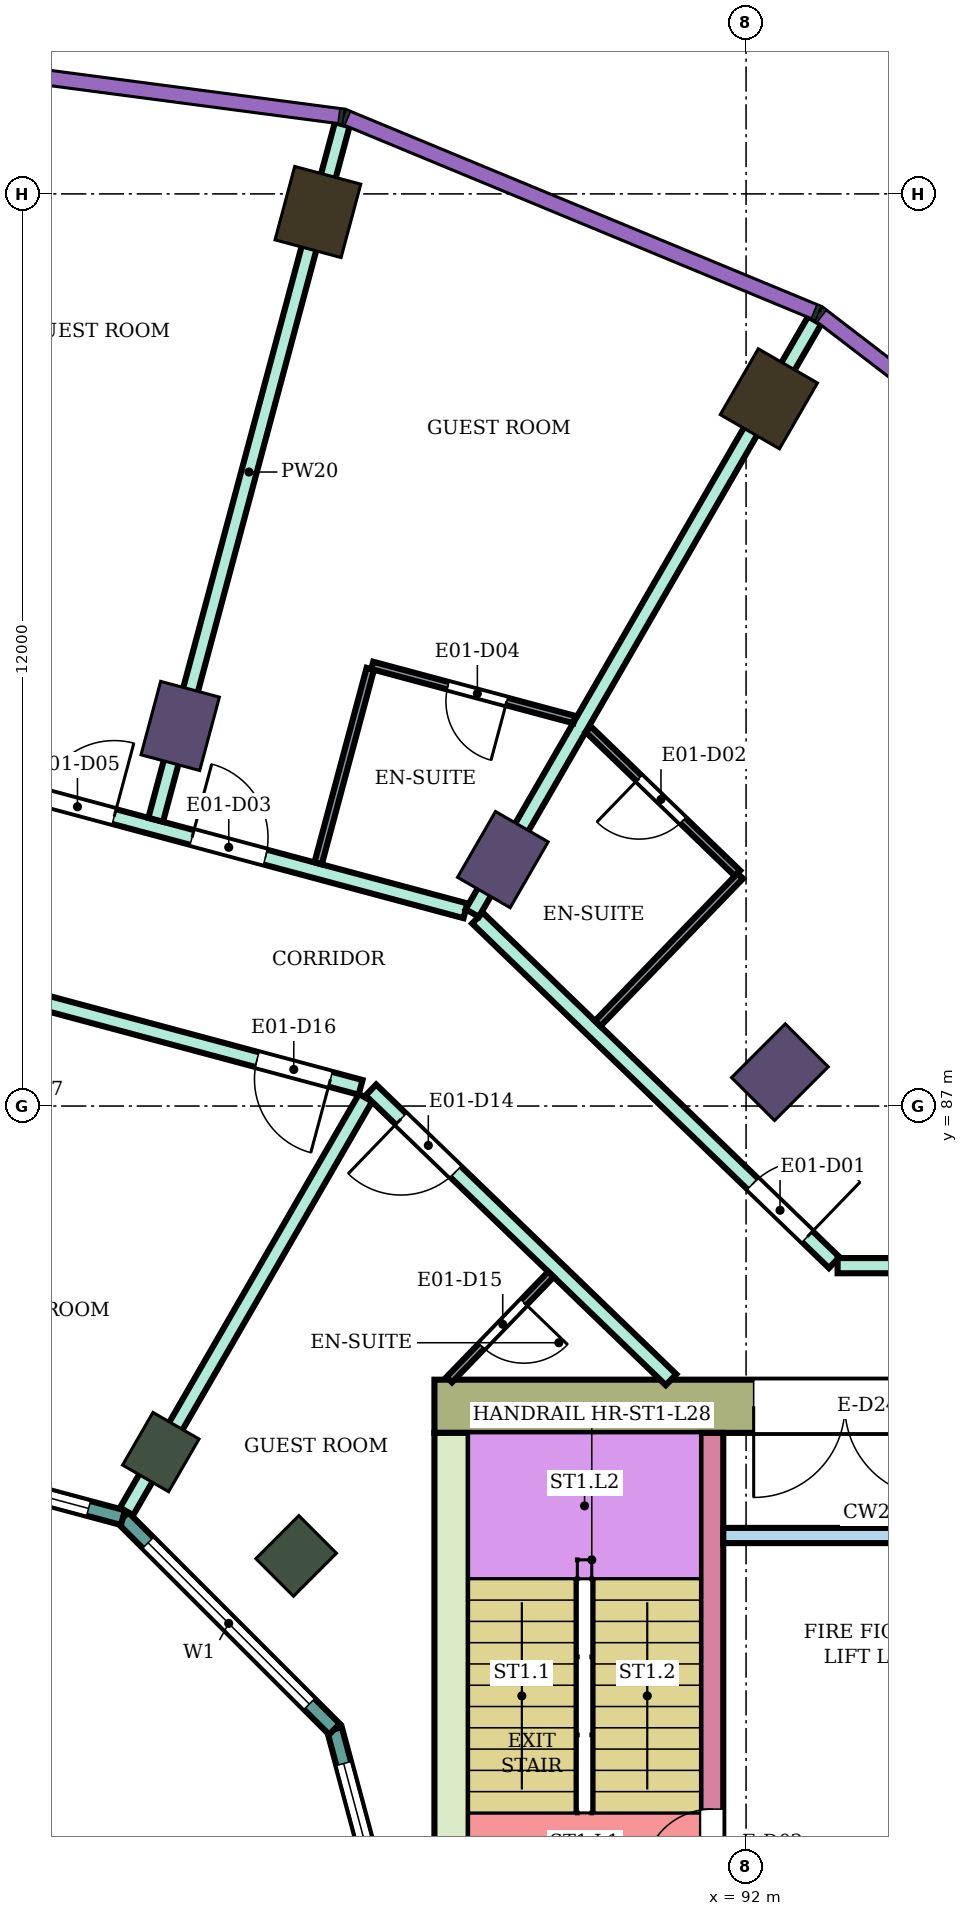
"""IFC4 building model, lengths in metres.
Left out: names, types, materials, properties, quantities, classifications, styles, units other than length and angle.
Written with IfcOpenShell. Run it as: python <this file> out.ifc"""

import sys

from ifc_helpers import new_model, si_unit, direction, frame, frame_2d, origin, origin_2d, place, context, subcontext, project, spatial, rectangle, extrude, element, fill, save


model = new_model("IFC4")
c1 = context("Model", 3, precision=1e-05, world=origin(), true_north=direction((0.0, 1.0)))
c2 = subcontext(c1, "Body", "Model", "MODEL_VIEW")
j1 = project(units=[si_unit("LENGTHUNIT", "METRE"), si_unit("PLANEANGLEUNIT", "RADIAN")], contexts=[c1])
p1 = place(None, origin())
s1 = spatial("IfcSite", under=j1, at=p1, CompositionType="ELEMENT")
p2 = place(p1, origin())
s2 = spatial("IfcBuilding", under=s1, at=p2, CompositionType="ELEMENT")
p3 = place(p2, frame((0.0, 0.0, 122.4)))
s3 = spatial("IfcBuildingStorey", under=s2, at=p3, CompositionType="ELEMENT", Elevation=122.4)
for number, where, z_axis, x_axis in (
    (1, (92.3, 96.304, 0.0), (0.0, 0.0, 1.0), (0.5, 0.866, 0.0)),
    (2, (86.367, 98.762, 0.0), (0.0, 0.0, 1.0), (0.259, 0.966, 0.0)),
):
    element("IfcColumn", number, at=place(p3, frame(where, z_axis=z_axis, x_axis=x_axis)), inside=s3, PredefinedType="COLUMN", context=c2, shape_type="SweptSolid", body=[
        extrude(rectangle(XDim=1.0, YDim=0.9, at=origin_2d()), origin(), (0.0, 0.0, 1.0), 3.9),
    ])
for number, where, z_axis, x_axis in (
    (3, (92.445, 87.445, 0.0), (0.0, 0.0, 1.0), (0.707, 0.707, 0.0)),
    (4, (88.8, 90.242, 0.0), (0.0, 0.0, 1.0), (0.5, 0.866, 0.0)),
    (5, (84.555, 92.0, 0.0), (0.0, 0.0, 1.0), (0.259, 0.966, 0.0)),
):
    element("IfcColumn", number, at=place(p3, frame(where, z_axis=z_axis, x_axis=x_axis)), inside=s3, PredefinedType="COLUMN", context=c2, shape_type="SweptSolid", body=[
        extrude(rectangle(XDim=1.0, YDim=0.8, at=origin_2d()), origin(), (0.0, 0.0, 1.0), 3.9),
    ])
for number, where, z_axis, x_axis in (
    (6, (86.081, 81.081, 0.0), (0.0, 0.0, 1.0), (0.707, 0.707, 0.0)),
    (7, (84.3, 82.448, 0.0), (0.0, 0.0, 1.0), (0.5, 0.866, 0.0)),
):
    element("IfcColumn", number, at=place(p3, frame(where, z_axis=z_axis, x_axis=x_axis)), inside=s3, PredefinedType="COLUMN", context=c2, shape_type="SweptSolid", body=[
        extrude(rectangle(XDim=0.8, YDim=0.7, at=origin_2d()), origin(), (0.0, 0.0, 1.0), 3.9),
    ])
p4 = place(p3, frame((87.9, 83.05, 0.0), z_axis=(0.0, 0.0, 1.0), x_axis=(1.0, 0.0, 0.0)))
e8 = element("IfcWall", 8, at=p4, inside=s3, PredefinedType="SHEAR", context=c2, shape_type="SweptSolid", body=[
    extrude(rectangle(XDim=14.8, YDim=0.7, at=frame_2d((7.4, 0.0))), origin(), (0.0, 0.0, 1.0), 3.58),
])
p5 = place(p4, frame((4.2, 0.0, 0.0)))
e9 = element("IfcOpeningElement", 9, at=p5, cuts=e8, PredefinedType="OPENING", context=c2, shape_type="SweptSolid", body=[
    extrude(rectangle(XDim=2.4, YDim=2.4, at=frame_2d((1.2, 1.2))), frame((0.0, 0.36, 0.0), z_axis=(0.0, -1.0, 0.0), x_axis=(1.0, 0.0, 0.0)), (0.0, 0.0, 1.0), 0.72),
])
p6 = place(p3, frame((88.125, 75.0, 0.0), z_axis=(0.0, 0.0, 1.0), x_axis=(0.0, 1.0, 0.0)))
e10 = element("IfcWall", 10, at=p6, inside=s3, PredefinedType="SHEAR", context=c2, shape_type="SweptSolid", body=[
    extrude(rectangle(XDim=7.7, YDim=0.45, at=frame_2d((3.85, 0.0))), origin(), (0.0, 0.0, 1.0), 3.58),
])
p7 = place(p3, frame((91.55, 75.0, 0.0), z_axis=(0.0, 0.0, 1.0), x_axis=(0.0, 1.0, 0.0)))
e11 = element("IfcWall", 11, at=p7, inside=s3, PredefinedType="SHEAR", context=c2, shape_type="SweptSolid", body=[
    extrude(rectangle(XDim=7.7, YDim=0.3, at=frame_2d((3.85, 0.0))), origin(), (0.0, 0.0, 1.0), 3.58),
])
p8 = place(p7, frame((1.85, 0.0, 0.0)))
e12 = element("IfcOpeningElement", 12, at=p8, cuts=e11, PredefinedType="OPENING", context=c2, shape_type="SweptSolid", body=[
    extrude(rectangle(XDim=0.9, YDim=2.1, at=frame_2d((0.45, 1.05))), frame((0.0, 0.16, 0.0), z_axis=(0.0, -1.0, 0.0), x_axis=(1.0, 0.0, 0.0)), (0.0, 0.0, 1.0), 0.32),
])
p9 = place(p3, frame((91.7, 81.35, 0.0), z_axis=(0.0, 0.0, 1.0), x_axis=(1.0, 0.0, 0.0)))
e13 = element("IfcWall", 13, at=p9, inside=s3, PredefinedType="SHEAR", context=c2, shape_type="SweptSolid", body=[
    extrude(rectangle(XDim=4.5, YDim=0.2, at=frame_2d((2.25, 0.0))), origin(), (0.0, 0.0, 1.0), 3.58),
])
p10 = place(p3, frame((87.604, 75.0, 0.0), z_axis=(0.0, 0.0, 1.0), x_axis=(-0.258789828301, 0.965933654434, 0.0)))
e14 = element("IfcWall", 14, at=p10, inside=s3, PredefinedType="NOTDEFINED", context=c2, shape_type="SweptSolid", body=[
    extrude(rectangle(XDim=3.936, YDim=0.2, at=frame_2d((1.968, 0.0))), origin(), (0.0, 0.0, 1.0), 3.9),
])
p11 = place(p10, frame((0.468, 0.0, 0.9)))
e15 = element("IfcOpeningElement", 15, at=p11, cuts=e14, PredefinedType="OPENING", context=c2, shape_type="SweptSolid", body=[
    extrude(rectangle(XDim=3.0, YDim=2.3, at=frame_2d((1.5, 1.15))), frame((0.0, 0.11, 0.0), z_axis=(0.0, -1.0, 0.0), x_axis=(1.0, 0.0, 0.0)), (0.0, 0.0, 1.0), 0.22),
])
p12 = place(p3, frame((86.585, 78.802, 0.0), z_axis=(0.0, 0.0, 1.0), x_axis=(-0.707106781187, 0.707106781187, 0.0)))
e16 = element("IfcWall", 16, at=p12, inside=s3, PredefinedType="NOTDEFINED", context=c2, shape_type="SweptSolid", body=[
    extrude(rectangle(XDim=3.936, YDim=0.2, at=frame_2d((1.968, 0.0))), origin(), (0.0, 0.0, 1.0), 3.9),
])
p13 = place(p12, frame((0.468, 0.0, 0.9)))
e17 = element("IfcOpeningElement", 17, at=p13, cuts=e16, PredefinedType="OPENING", context=c2, shape_type="SweptSolid", body=[
    extrude(rectangle(XDim=3.0, YDim=2.3, at=frame_2d((1.5, 1.15))), frame((0.0, 0.11, 0.0), z_axis=(0.0, -1.0, 0.0), x_axis=(1.0, 0.0, 0.0)), (0.0, 0.0, 1.0), 0.22),
])
p14 = place(p3, frame((83.802, 81.585, 0.0), z_axis=(0.0, 0.0, 1.0), x_axis=(-0.965933654434, 0.258789828301, 0.0)))
e18 = element("IfcWall", 18, at=p14, inside=s3, PredefinedType="NOTDEFINED", context=c2, shape_type="SweptSolid", body=[
    extrude(rectangle(XDim=3.936, YDim=0.2, at=frame_2d((1.968, 0.0))), origin(), (0.0, 0.0, 1.0), 3.9),
])
p15 = place(p14, frame((0.468, 0.0, 0.9)))
e19 = element("IfcOpeningElement", 19, at=p15, cuts=e18, PredefinedType="OPENING", context=c2, shape_type="SweptSolid", body=[
    extrude(rectangle(XDim=3.0, YDim=2.3, at=frame_2d((1.5, 1.15))), frame((0.0, 0.11, 0.0), z_axis=(0.0, -1.0, 0.0), x_axis=(1.0, 0.0, 0.0)), (0.0, 0.0, 1.0), 0.22),
])
p16 = place(p3, frame((80.0, 89.104, 0.0), z_axis=(0.0, 0.0, 1.0), x_axis=(0.965856548257, -0.259077455964, 0.0)))
e20 = element("IfcWall", 20, at=p16, inside=s3, PredefinedType="PARTITIONING", context=c2, shape_type="SweptSolid", body=[
    extrude(rectangle(XDim=7.173, YDim=0.2, at=frame_2d((3.586, 0.0))), origin(), (0.0, 0.0, 1.0), 3.45),
])
p17 = place(p16, frame((5.763, 0.0, 0.0)))
e21 = element("IfcOpeningElement", 21, at=p17, cuts=e20, PredefinedType="OPENING", context=c2, shape_type="SweptSolid", body=[
    extrude(rectangle(XDim=1.0, YDim=2.1, at=frame_2d((0.5, 1.05))), frame((0.0, 0.11, 0.0), z_axis=(0.0, -1.0, 0.0), x_axis=(1.0, 0.0, 0.0)), (0.0, 0.0, 1.0), 0.22),
])
p18 = place(p3, frame((80.0, 91.797, 0.0), z_axis=(0.0, 0.0, 1.0), x_axis=(0.965857042792, -0.259075612301, 0.0)))
e22 = element("IfcWall", 22, at=p18, inside=s3, PredefinedType="PARTITIONING", context=c2, shape_type="SweptSolid", body=[
    extrude(rectangle(XDim=8.602, YDim=0.2, at=frame_2d((4.301, 0.0))), origin(), (0.0, 0.0, 1.0), 3.45),
])
p19 = place(p18, frame((4.877, 0.0, 0.0)))
e23 = element("IfcOpeningElement", 23, at=p19, cuts=e22, PredefinedType="OPENING", context=c2, shape_type="SweptSolid", body=[
    extrude(rectangle(XDim=1.0, YDim=2.1, at=frame_2d((0.5, 1.05))), frame((0.0, 0.11, 0.0), z_axis=(0.0, -1.0, 0.0), x_axis=(1.0, 0.0, 0.0)), (0.0, 0.0, 1.0), 0.22),
])
p20 = place(p18, frame((2.817, 0.0, 0.0)))
e24 = element("IfcOpeningElement", 24, at=p20, cuts=e22, PredefinedType="OPENING", context=c2, shape_type="SweptSolid", body=[
    extrude(rectangle(XDim=1.0, YDim=2.1, at=frame_2d((0.5, 1.05))), frame((0.0, 0.11, 0.0), z_axis=(0.0, -1.0, 0.0), x_axis=(1.0, 0.0, 0.0)), (0.0, 0.0, 1.0), 0.22),
])
p21 = place(p3, frame((83.85, 81.667, 0.0), z_axis=(0.0, 0.0, 1.0), x_axis=(0.500224530691, 0.865895732115, 0.0)))
e25 = element("IfcWall", 25, at=p21, inside=s3, PredefinedType="PARTITIONING", context=c2, shape_type="SweptSolid", body=[
    extrude(rectangle(XDim=6.285, YDim=0.2, at=frame_2d((3.143, 0.0))), origin(), (0.0, 0.0, 1.0), 3.45),
])
p22 = place(p3, frame((84.233, 90.765, 0.0), z_axis=(0.0, 0.0, 1.0), x_axis=(0.259046484815, 0.965864855301, 0.0)))
e26 = element("IfcWall", 26, at=p22, inside=s3, PredefinedType="PARTITIONING", context=c2, shape_type="SweptSolid", body=[
    extrude(rectangle(XDim=9.475, YDim=0.2, at=frame_2d((4.737, 0.0))), origin(), (0.0, 0.0, 1.0), 3.45),
])
p23 = place(p3, frame((87.064, 87.211, 0.0), z_axis=(0.0, 0.0, 1.0), x_axis=(0.719540958932, -0.694450004262, 0.0)))
e27 = element("IfcWall", 27, at=p23, inside=s3, PredefinedType="PARTITIONING", context=c2, shape_type="SweptSolid", body=[
    extrude(rectangle(XDim=5.488, YDim=0.2, at=frame_2d((2.744, 0.0))), origin(), (0.0, 0.0, 1.0), 3.45),
])
p24 = place(p23, frame((0.55, 0.0, 0.0)))
e28 = element("IfcOpeningElement", 28, at=p24, cuts=e27, PredefinedType="OPENING", context=c2, shape_type="SweptSolid", body=[
    extrude(rectangle(XDim=1.0, YDim=2.1, at=frame_2d((0.5, 1.05))), frame((0.0, 0.11, 0.0), z_axis=(0.0, -1.0, 0.0), x_axis=(1.0, 0.0, 0.0)), (0.0, 0.0, 1.0), 0.22),
])
p25 = place(p3, frame((88.466, 89.473, 0.0), z_axis=(0.0, 0.0, 1.0), x_axis=(0.719346014649, -0.694651935295, 0.0)))
e29 = element("IfcWall", 29, at=p25, inside=s3, PredefinedType="PARTITIONING", context=c2, shape_type="SweptSolid", body=[
    extrude(rectangle(XDim=6.525, YDim=0.2, at=frame_2d((3.263, 0.0))), origin(), (0.0, 0.0, 1.0), 3.45),
])
p26 = place(p25, frame((5.034, 0.0, 0.0)))
e30 = element("IfcOpeningElement", 30, at=p26, cuts=e29, PredefinedType="OPENING", context=c2, shape_type="SweptSolid", body=[
    extrude(rectangle(XDim=1.0, YDim=2.1, at=frame_2d((0.5, 1.05))), frame((0.0, 0.11, 0.0), z_axis=(0.0, -1.0, 0.0), x_axis=(1.0, 0.0, 0.0)), (0.0, 0.0, 1.0), 0.22),
])
p27 = place(p3, frame((88.398, 89.539, 0.0), z_axis=(0.0, 0.0, 1.0), x_axis=(0.500217530286, 0.865899776184, 0.0)))
e31 = element("IfcWall", 31, at=p27, inside=s3, PredefinedType="PARTITIONING", context=c2, shape_type="SweptSolid", body=[
    extrude(rectangle(XDim=9.006, YDim=0.2, at=frame_2d((4.503, 0.0))), origin(), (0.0, 0.0, 1.0), 3.45),
])
p28 = place(p3, frame((93.204, 84.9, 0.0), z_axis=(0.0, 0.0, 1.0), x_axis=(1.0, 0.0, 0.0)))
e32 = element("IfcWall", 32, at=p28, inside=s3, PredefinedType="PARTITIONING", context=c2, shape_type="SweptSolid", body=[
    extrude(rectangle(XDim=1.496, YDim=0.2, at=frame_2d((0.748, 0.0))), origin(), (0.0, 0.0, 1.0), 3.45),
])
p29 = place(p3, frame((86.37, 90.193, 0.0), z_axis=(0.0, 0.0, 1.0), x_axis=(0.259044695829, 0.965865335108, 0.0)))
e33 = element("IfcWall", 33, at=p29, inside=s3, PredefinedType="PARTITIONING", context=c2, shape_type="SweptSolid", body=[
    extrude(rectangle(XDim=2.649, YDim=0.1, at=frame_2d((1.325, 0.0))), origin(), (0.0, 0.0, 1.0), 3.45),
])
p30 = place(p3, frame((87.082, 92.797, 0.0), z_axis=(0.0, 0.0, 1.0), x_axis=(0.965892621415, -0.258942935598, 0.0)))
e34 = element("IfcWall", 34, at=p30, inside=s3, PredefinedType="PARTITIONING", context=c2, shape_type="SweptSolid", body=[
    extrude(rectangle(XDim=2.753, YDim=0.1, at=frame_2d((1.376, 0.0))), origin(), (0.0, 0.0, 1.0), 3.45),
])
p31 = place(p30, frame((1.032, 0.0, 0.0)))
e35 = element("IfcOpeningElement", 35, at=p31, cuts=e34, PredefinedType="OPENING", context=c2, shape_type="SweptSolid", body=[
    extrude(rectangle(XDim=0.8, YDim=2.1, at=frame_2d((0.4, 1.05))), frame((0.0, 0.06, 0.0), z_axis=(0.0, -1.0, 0.0), x_axis=(1.0, 0.0, 0.0)), (0.0, 0.0, 1.0), 0.12),
])
p32 = place(p3, frame((88.095, 83.4, 0.0), z_axis=(0.0, 0.0, 1.0), x_axis=(0.694447472534, 0.719543402368, 0.0)))
e36 = element("IfcWall", 36, at=p32, inside=s3, PredefinedType="PARTITIONING", context=c2, shape_type="SweptSolid", body=[
    extrude(rectangle(XDim=1.926, YDim=0.1, at=frame_2d((0.963, 0.0))), origin(), (0.0, 0.0, 1.0), 3.45),
])
p33 = place(p32, frame((0.613, 0.0, 0.0)))
e37 = element("IfcOpeningElement", 37, at=p33, cuts=e36, PredefinedType="OPENING", context=c2, shape_type="SweptSolid", body=[
    extrude(rectangle(XDim=0.8, YDim=2.1, at=frame_2d((0.4, 1.05))), frame((0.0, 0.06, 0.0), z_axis=(0.0, -1.0, 0.0), x_axis=(1.0, 0.0, 0.0)), (0.0, 0.0, 1.0), 0.12),
])
p34 = place(p3, frame((89.925, 91.956, 0.0), z_axis=(0.0, 0.0, 1.0), x_axis=(0.719395291255, -0.694600903339, 0.0)))
e38 = element("IfcWall", 38, at=p34, inside=s3, PredefinedType="PARTITIONING", context=c2, shape_type="SweptSolid", body=[
    extrude(rectangle(XDim=2.728, YDim=0.1, at=frame_2d((1.364, 0.0))), origin(), (0.0, 0.0, 1.0), 3.45),
])
p35 = place(p34, frame((0.928, 0.0, 0.0)))
e39 = element("IfcOpeningElement", 39, at=p35, cuts=e38, PredefinedType="OPENING", context=c2, shape_type="SweptSolid", body=[
    extrude(rectangle(XDim=0.8, YDim=2.1, at=frame_2d((0.4, 1.05))), frame((0.0, 0.06, 0.0), z_axis=(0.0, -1.0, 0.0), x_axis=(1.0, 0.0, 0.0)), (0.0, 0.0, 1.0), 0.12),
])
p36 = place(p3, frame((90.048, 88.085, 0.0), z_axis=(0.0, 0.0, 1.0), x_axis=(0.694655834207, 0.71934224956, 0.0)))
e40 = element("IfcWall", 40, at=p36, inside=s3, PredefinedType="PARTITIONING", context=c2, shape_type="SweptSolid", body=[
    extrude(rectangle(XDim=2.7, YDim=0.1, at=frame_2d((1.35, 0.0))), origin(), (0.0, 0.0, 1.0), 3.45),
])
p37 = place(p11, origin())
e41 = element("IfcWindow", 41, at=p37, inside=s3, PartitioningType="SINGLE_PANEL", PredefinedType="WINDOW", context=c2, shape_type="SweptSolid", body=[
    extrude(rectangle(XDim=3.0, YDim=2.3, at=frame_2d((1.5, 1.15))), frame((0.0, 0.03, 0.0), z_axis=(0.0, -1.0, 0.0), x_axis=(1.0, 0.0, 0.0)), (0.0, 0.0, 1.0), 0.06),
])
fill(e15, e41)
p38 = place(p13, origin())
e42 = element("IfcWindow", 42, at=p38, inside=s3, PartitioningType="SINGLE_PANEL", PredefinedType="WINDOW", context=c2, shape_type="SweptSolid", body=[
    extrude(rectangle(XDim=3.0, YDim=2.3, at=frame_2d((1.5, 1.15))), frame((0.0, 0.03, 0.0), z_axis=(0.0, -1.0, 0.0), x_axis=(1.0, 0.0, 0.0)), (0.0, 0.0, 1.0), 0.06),
])
fill(e17, e42)
p39 = place(p15, origin())
e43 = element("IfcWindow", 43, at=p39, inside=s3, PartitioningType="SINGLE_PANEL", PredefinedType="WINDOW", context=c2, shape_type="SweptSolid", body=[
    extrude(rectangle(XDim=3.0, YDim=2.3, at=frame_2d((1.5, 1.15))), frame((0.0, 0.03, 0.0), z_axis=(0.0, -1.0, 0.0), x_axis=(1.0, 0.0, 0.0)), (0.0, 0.0, 1.0), 0.06),
])
fill(e19, e43)
p40 = place(p26, origin())
e44 = element("IfcDoor", 44, at=p40, inside=s3, OperationType="SINGLE_SWING_RIGHT", PredefinedType="DOOR", context=c2, shape_type="SweptSolid", body=[
    extrude(rectangle(XDim=1.0, YDim=2.1, at=frame_2d((0.5, 1.05))), frame((0.0, 0.025, 0.0), z_axis=(0.0, -1.0, 0.0), x_axis=(1.0, 0.0, 0.0)), (0.0, 0.0, 1.0), 0.05),
])
fill(e30, e44)
p41 = place(p35, frame((0.8, 0.0, 0.0), z_axis=(0.0, 0.0, 1.0), x_axis=(-1.0, 0.0, 0.0)))
e45 = element("IfcDoor", 45, at=p41, inside=s3, OperationType="SINGLE_SWING_RIGHT", PredefinedType="DOOR", context=c2, shape_type="SweptSolid", body=[
    extrude(rectangle(XDim=0.8, YDim=2.1, at=frame_2d((0.4, 1.05))), frame((0.0, 0.025, 0.0), z_axis=(0.0, -1.0, 0.0), x_axis=(1.0, 0.0, 0.0)), (0.0, 0.0, 1.0), 0.05),
])
fill(e39, e45)
p42 = place(p19, origin())
e46 = element("IfcDoor", 46, at=p42, inside=s3, OperationType="SINGLE_SWING_LEFT", PredefinedType="DOOR", context=c2, shape_type="SweptSolid", body=[
    extrude(rectangle(XDim=1.0, YDim=2.1, at=frame_2d((0.5, 1.05))), frame((0.0, 0.025, 0.0), z_axis=(0.0, -1.0, 0.0), x_axis=(1.0, 0.0, 0.0)), (0.0, 0.0, 1.0), 0.05),
])
fill(e23, e46)
p43 = place(p31, frame((0.8, 0.0, 0.0), z_axis=(0.0, 0.0, 1.0), x_axis=(-1.0, 0.0, 0.0)))
e47 = element("IfcDoor", 47, at=p43, inside=s3, OperationType="SINGLE_SWING_LEFT", PredefinedType="DOOR", context=c2, shape_type="SweptSolid", body=[
    extrude(rectangle(XDim=0.8, YDim=2.1, at=frame_2d((0.4, 1.05))), frame((0.0, 0.025, 0.0), z_axis=(0.0, -1.0, 0.0), x_axis=(1.0, 0.0, 0.0)), (0.0, 0.0, 1.0), 0.05),
])
fill(e35, e47)
p44 = place(p20, origin())
e48 = element("IfcDoor", 48, at=p44, inside=s3, OperationType="SINGLE_SWING_RIGHT", PredefinedType="DOOR", context=c2, shape_type="SweptSolid", body=[
    extrude(rectangle(XDim=1.0, YDim=2.1, at=frame_2d((0.5, 1.05))), frame((0.0, 0.025, 0.0), z_axis=(0.0, -1.0, 0.0), x_axis=(1.0, 0.0, 0.0)), (0.0, 0.0, 1.0), 0.05),
])
fill(e24, e48)
p45 = place(p24, frame((1.0, 0.0, 0.0), z_axis=(0.0, 0.0, 1.0), x_axis=(-1.0, 0.0, 0.0)))
e49 = element("IfcDoor", 49, at=p45, inside=s3, OperationType="SINGLE_SWING_RIGHT", PredefinedType="DOOR", context=c2, shape_type="SweptSolid", body=[
    extrude(rectangle(XDim=1.0, YDim=2.1, at=frame_2d((0.5, 1.05))), frame((0.0, 0.025, 0.0), z_axis=(0.0, -1.0, 0.0), x_axis=(1.0, 0.0, 0.0)), (0.0, 0.0, 1.0), 0.05),
])
fill(e28, e49)
p46 = place(p33, frame((0.8, 0.0, 0.0), z_axis=(0.0, 0.0, 1.0), x_axis=(-1.0, 0.0, 0.0)))
e50 = element("IfcDoor", 50, at=p46, inside=s3, OperationType="SINGLE_SWING_LEFT", PredefinedType="DOOR", context=c2, shape_type="SweptSolid", body=[
    extrude(rectangle(XDim=0.8, YDim=2.1, at=frame_2d((0.4, 1.05))), frame((0.0, 0.025, 0.0), z_axis=(0.0, -1.0, 0.0), x_axis=(1.0, 0.0, 0.0)), (0.0, 0.0, 1.0), 0.05),
])
fill(e37, e50)
p47 = place(p17, frame((1.0, 0.0, 0.0), z_axis=(0.0, 0.0, 1.0), x_axis=(-1.0, 0.0, 0.0)))
e51 = element("IfcDoor", 51, at=p47, inside=s3, OperationType="SINGLE_SWING_LEFT", PredefinedType="DOOR", context=c2, shape_type="SweptSolid", body=[
    extrude(rectangle(XDim=1.0, YDim=2.1, at=frame_2d((0.5, 1.05))), frame((0.0, 0.025, 0.0), z_axis=(0.0, -1.0, 0.0), x_axis=(1.0, 0.0, 0.0)), (0.0, 0.0, 1.0), 0.05),
])
fill(e21, e51)
p48 = place(p8, origin())
e52 = element("IfcDoor", 52, at=p48, inside=s3, OperationType="SINGLE_SWING_LEFT", PredefinedType="DOOR", context=c2, shape_type="SweptSolid", body=[
    extrude(rectangle(XDim=0.9, YDim=2.1, at=frame_2d((0.45, 1.05))), frame((0.0, 0.025, 0.0), z_axis=(0.0, -1.0, 0.0), x_axis=(1.0, 0.0, 0.0)), (0.0, 0.0, 1.0), 0.05),
])
fill(e12, e52)
p49 = place(p5, frame((2.4, 0.0, 0.0), z_axis=(0.0, 0.0, 1.0), x_axis=(-1.0, 0.0, 0.0)))
e53 = element("IfcDoor", 53, at=p49, inside=s3, OperationType="DOUBLE_DOOR_SINGLE_SWING", PredefinedType="DOOR", context=c2, shape_type="SweptSolid", body=[
    extrude(rectangle(XDim=2.4, YDim=2.4, at=frame_2d((1.2, 1.2))), frame((0.0, 0.025, 0.0), z_axis=(0.0, -1.0, 0.0), x_axis=(1.0, 0.0, 0.0)), (0.0, 0.0, 1.0), 0.05),
])
fill(e9, e53)
save(model, sys.argv[1])
